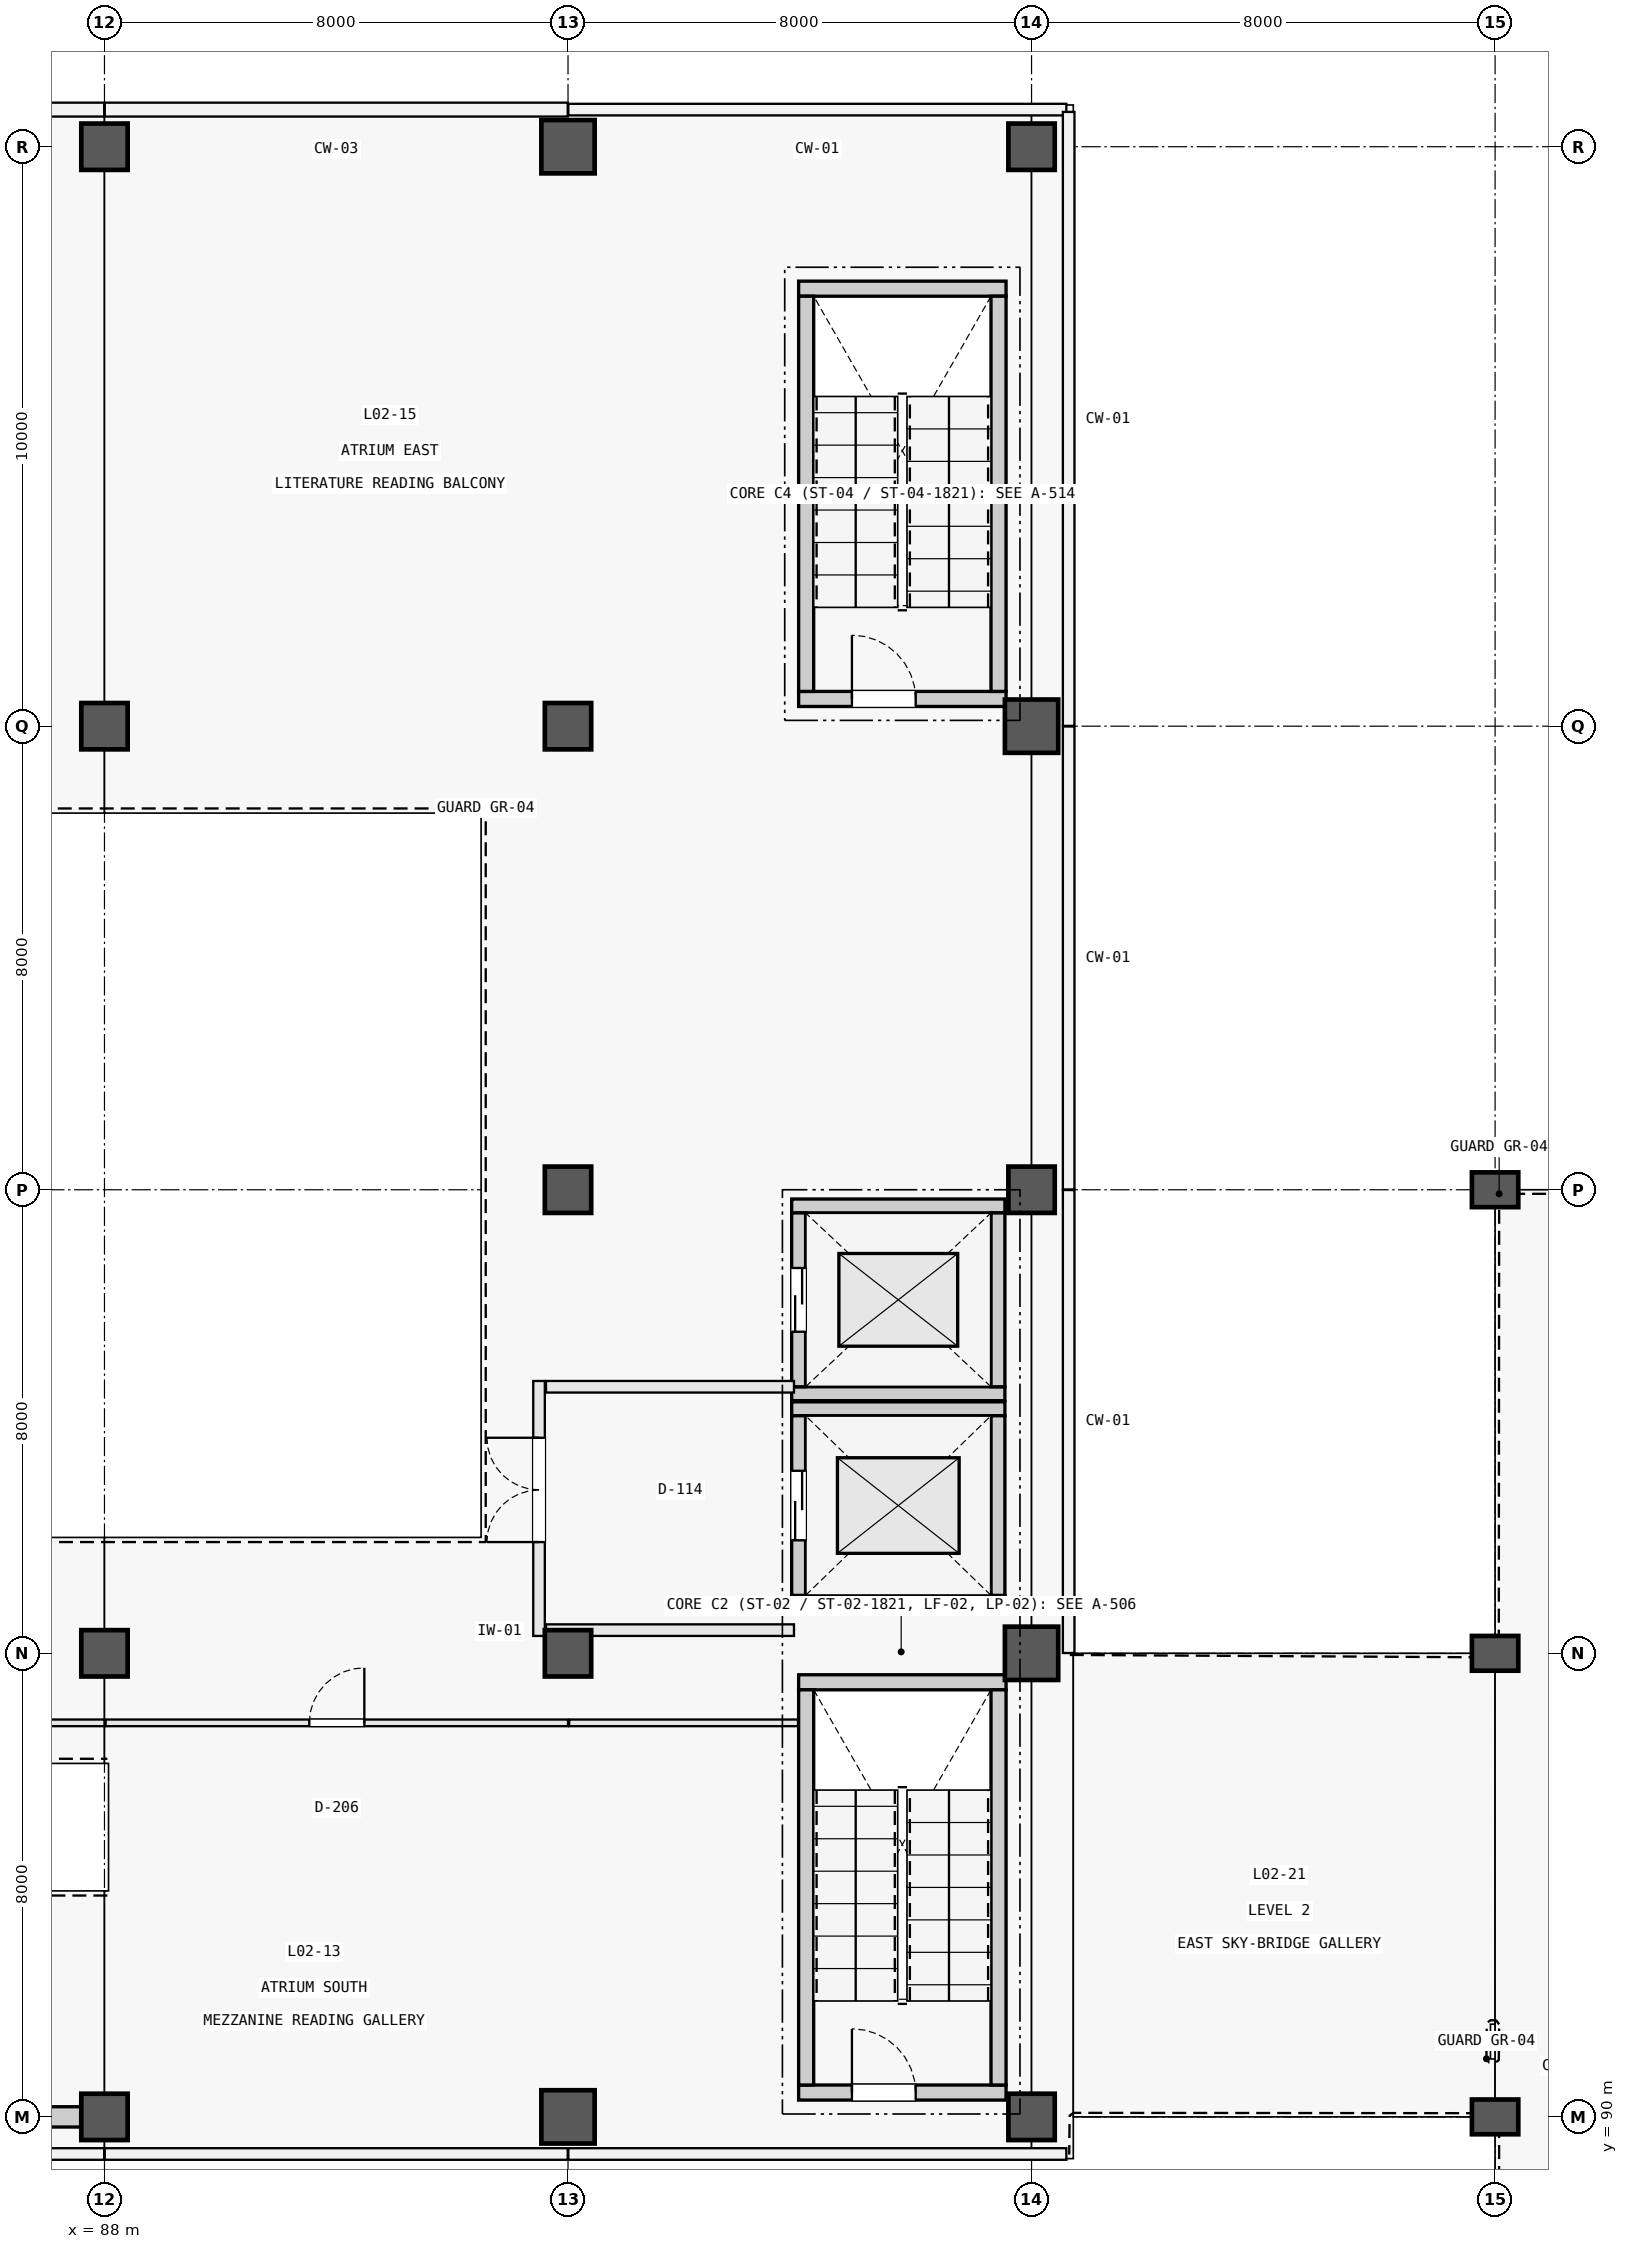
"""IFC4 building model, lengths in metres.
Left out: names, types, materials, properties, quantities, classifications, styles, units other than length and angle.
Written with IfcOpenShell. Run it as: python <this file> out.ifc"""

import sys

from ifc_helpers import new_model, si_unit, direction, frame, frame_2d, origin, origin_2d, place, context, subcontext, project, spatial, rectangle, extrude, element, fill, save


model = new_model("IFC4")
c1 = context("Model", 3, precision=1e-05, world=origin(), true_north=direction((0.0, 1.0)))
c2 = subcontext(c1, "Body", "Model", "MODEL_VIEW")
j1 = project(units=[si_unit("LENGTHUNIT", "METRE"), si_unit("PLANEANGLEUNIT", "RADIAN")], contexts=[c1])
p1 = place(None, origin())
s1 = spatial("IfcSite", under=j1, at=p1, CompositionType="ELEMENT")
p2 = place(p1, origin())
s2 = spatial("IfcBuilding", under=s1, at=p2, CompositionType="ELEMENT")
p3 = place(p2, frame((0.0, 0.0, 5.4)))
s3 = spatial("IfcBuildingStorey", under=s2, at=p3, CompositionType="ELEMENT", Elevation=5.4)
for number, where, z_axis, x_axis in (
    (1, (88.0, 90.0, 0.0), (0.0, 0.0, 1.0), (1.0, 0.0, 0.0)),
    (2, (88.0, 98.0, 0.0), (0.0, 0.0, 1.0), (1.0, 0.0, 0.0)),
    (3, (88.0, 114.0, 0.0), (0.0, 0.0, 1.0), (1.0, 0.0, 0.0)),
    (4, (88.0, 124.0, 0.0), (0.0, 0.0, 1.0), (1.0, 0.0, 0.0)),
):
    element("IfcColumn", number, at=place(p3, frame(where, z_axis=z_axis, x_axis=x_axis)), inside=s3, PredefinedType="COLUMN", context=c2, shape_type="SweptSolid", body=[
        extrude(rectangle(XDim=0.8, YDim=0.8, at=origin_2d()), origin(), (0.0, 0.0, 1.0), 5.1),
    ])
p4 = place(p3, frame((96.0, 90.0, 0.0), z_axis=(0.0, 0.0, 1.0), x_axis=(1.0, 0.0, 0.0)))
e5 = element("IfcColumn", 5, at=p4, inside=s3, PredefinedType="COLUMN", context=c2, shape_type="SweptSolid", body=[
    extrude(rectangle(XDim=0.92, YDim=0.92, at=origin_2d()), origin(), (0.0, 0.0, 1.0), 5.1),
])
for number, where, z_axis, x_axis in (
    (6, (96.0, 98.0, 0.0), (0.0, 0.0, 1.0), (1.0, 0.0, 0.0)),
    (7, (96.0, 106.0, 0.0), (0.0, 0.0, 1.0), (1.0, 0.0, 0.0)),
    (8, (96.0, 114.0, 0.0), (0.0, 0.0, 1.0), (1.0, 0.0, 0.0)),
):
    element("IfcColumn", number, at=place(p3, frame(where, z_axis=z_axis, x_axis=x_axis)), inside=s3, PredefinedType="COLUMN", context=c2, shape_type="SweptSolid", body=[
        extrude(rectangle(XDim=0.8, YDim=0.8, at=origin_2d()), origin(), (0.0, 0.0, 1.0), 5.1),
    ])
p5 = place(p3, frame((96.0, 124.0, 0.0), z_axis=(0.0, 0.0, 1.0), x_axis=(1.0, 0.0, 0.0)))
e9 = element("IfcColumn", 9, at=p5, inside=s3, PredefinedType="COLUMN", context=c2, shape_type="SweptSolid", body=[
    extrude(rectangle(XDim=0.92, YDim=0.92, at=origin_2d()), origin(), (0.0, 0.0, 1.0), 5.1),
])
p6 = place(p3, frame((104.0, 90.0, 0.0), z_axis=(0.0, 0.0, 1.0), x_axis=(1.0, 0.0, 0.0)))
e10 = element("IfcColumn", 10, at=p6, inside=s3, PredefinedType="COLUMN", context=c2, shape_type="SweptSolid", body=[
    extrude(rectangle(XDim=0.8, YDim=0.8, at=origin_2d()), origin(), (0.0, 0.0, 1.0), 5.1),
])
p7 = place(p3, frame((104.0, 98.0, 0.0), z_axis=(0.0, 0.0, 1.0), x_axis=(1.0, 0.0, 0.0)))
e11 = element("IfcColumn", 11, at=p7, inside=s3, PredefinedType="COLUMN", context=c2, shape_type="SweptSolid", body=[
    extrude(rectangle(XDim=0.92, YDim=0.92, at=origin_2d()), origin(), (0.0, 0.0, 1.0), 5.1),
])
p8 = place(p3, frame((104.0, 106.0, 0.0), z_axis=(0.0, 0.0, 1.0), x_axis=(1.0, 0.0, 0.0)))
e12 = element("IfcColumn", 12, at=p8, inside=s3, PredefinedType="COLUMN", context=c2, shape_type="SweptSolid", body=[
    extrude(rectangle(XDim=0.8, YDim=0.8, at=origin_2d()), origin(), (0.0, 0.0, 1.0), 5.1),
])
p9 = place(p3, frame((104.0, 114.0, 0.0), z_axis=(0.0, 0.0, 1.0), x_axis=(1.0, 0.0, 0.0)))
e13 = element("IfcColumn", 13, at=p9, inside=s3, PredefinedType="COLUMN", context=c2, shape_type="SweptSolid", body=[
    extrude(rectangle(XDim=0.92, YDim=0.92, at=origin_2d()), origin(), (0.0, 0.0, 1.0), 5.1),
])
p10 = place(p3, frame((104.0, 124.0, 0.0), z_axis=(0.0, 0.0, 1.0), x_axis=(1.0, 0.0, 0.0)))
e14 = element("IfcColumn", 14, at=p10, inside=s3, PredefinedType="COLUMN", context=c2, shape_type="SweptSolid", body=[
    extrude(rectangle(XDim=0.8, YDim=0.8, at=origin_2d()), origin(), (0.0, 0.0, 1.0), 5.1),
])
for number, where, z_axis, x_axis in (
    (15, (112.0, 90.0, 0.0), (0.0, 0.0, 1.0), (1.0, 0.0, 0.0)),
    (16, (112.0, 98.0, 0.0), (0.0, 0.0, 1.0), (1.0, 0.0, 0.0)),
    (17, (112.0, 106.0, 0.0), (0.0, 0.0, 1.0), (1.0, 0.0, 0.0)),
):
    element("IfcColumn", number, at=place(p3, frame(where, z_axis=z_axis, x_axis=x_axis)), inside=s3, PredefinedType="COLUMN", context=c2, shape_type="SweptSolid", body=[
        extrude(rectangle(XDim=0.8, YDim=0.6, at=origin_2d()), origin(), (0.0, 0.0, 1.0), 5.1),
    ])
p11 = place(p3, frame((80.46, 90.0, 0.0), z_axis=(0.0, 0.0, 1.0), x_axis=(1.0, 0.0, 0.0)))
e18 = element("IfcWall", 18, at=p11, inside=s3, PredefinedType="SHEAR", context=c2, shape_type="SweptSolid", body=[
    extrude(rectangle(XDim=7.14, YDim=0.35, at=frame_2d((3.57, 0.0))), origin(), (0.0, 0.0, 1.0), 4.76),
])
p12 = place(p3, frame((99.98, 90.42, 0.0), z_axis=(0.0, 0.0, 1.0), x_axis=(1.0, 0.0, 0.0)))
e19 = element("IfcWall", 19, at=p12, inside=s3, PredefinedType="SOLIDWALL", context=c2, shape_type="SweptSolid", body=[
    extrude(rectangle(XDim=3.58, YDim=0.26, at=frame_2d((1.79, 0.0))), origin(), (0.0, 0.0, 1.0), 5.1),
])
p13 = place(p12, frame((0.92, 0.0, 0.0)))
e20 = element("IfcOpeningElement", 20, at=p13, cuts=e19, PredefinedType="OPENING", context=c2, shape_type="SweptSolid", body=[
    extrude(rectangle(XDim=1.1, YDim=2.2, at=frame_2d((0.55, 1.1))), frame((0.0, 0.142, 0.0), z_axis=(0.0, -1.0, 0.0), x_axis=(1.0, 0.0, 0.0)), (0.0, 0.0, 1.0), 0.284),
])
p14 = place(p3, frame((99.98, 97.5, 0.0), z_axis=(0.0, 0.0, 1.0), x_axis=(1.0, 0.0, 0.0)))
e21 = element("IfcWall", 21, at=p14, inside=s3, PredefinedType="SOLIDWALL", context=c2, shape_type="SweptSolid", body=[
    extrude(rectangle(XDim=3.58, YDim=0.26, at=frame_2d((1.79, 0.0))), origin(), (0.0, 0.0, 1.0), 5.1),
])
for number, where, z_axis, x_axis in (
    (22, (100.11, 90.55, 0.0), (0.0, 0.0, 1.0), (0.0, 1.0, 0.0)),
    (23, (103.43, 90.55, 0.0), (0.0, 0.0, 1.0), (0.0, 1.0, 0.0)),
):
    element("IfcWall", number, at=place(p3, frame(where, z_axis=z_axis, x_axis=x_axis)), inside=s3, PredefinedType="SOLIDWALL", context=c2, shape_type="SweptSolid", body=[
        extrude(rectangle(XDim=6.82, YDim=0.26, at=frame_2d((3.41, 0.0))), origin(), (0.0, 0.0, 1.0), 5.1),
    ])
p15 = place(p3, frame((99.98, 114.47, 0.0), z_axis=(0.0, 0.0, 1.0), x_axis=(1.0, 0.0, 0.0)))
e24 = element("IfcWall", 24, at=p15, inside=s3, PredefinedType="SOLIDWALL", context=c2, shape_type="SweptSolid", body=[
    extrude(rectangle(XDim=3.58, YDim=0.26, at=frame_2d((1.79, 0.0))), origin(), (0.0, 0.0, 1.0), 5.1),
])
p16 = place(p15, frame((0.92, 0.0, 0.0)))
e25 = element("IfcOpeningElement", 25, at=p16, cuts=e24, PredefinedType="OPENING", context=c2, shape_type="SweptSolid", body=[
    extrude(rectangle(XDim=1.1, YDim=2.2, at=frame_2d((0.55, 1.1))), frame((0.0, 0.142, 0.0), z_axis=(0.0, -1.0, 0.0), x_axis=(1.0, 0.0, 0.0)), (0.0, 0.0, 1.0), 0.284),
])
p17 = place(p3, frame((99.98, 121.55, 0.0), z_axis=(0.0, 0.0, 1.0), x_axis=(1.0, 0.0, 0.0)))
e26 = element("IfcWall", 26, at=p17, inside=s3, PredefinedType="SOLIDWALL", context=c2, shape_type="SweptSolid", body=[
    extrude(rectangle(XDim=3.58, YDim=0.26, at=frame_2d((1.79, 0.0))), origin(), (0.0, 0.0, 1.0), 5.1),
])
for number, where, z_axis, x_axis in (
    (27, (100.11, 114.6, 0.0), (0.0, 0.0, 1.0), (0.0, 1.0, 0.0)),
    (28, (103.43, 114.6, 0.0), (0.0, 0.0, 1.0), (0.0, 1.0, 0.0)),
):
    element("IfcWall", number, at=place(p3, frame(where, z_axis=z_axis, x_axis=x_axis)), inside=s3, PredefinedType="SOLIDWALL", context=c2, shape_type="SweptSolid", body=[
        extrude(rectangle(XDim=6.82, YDim=0.26, at=frame_2d((3.41, 0.0))), origin(), (0.0, 0.0, 1.0), 5.1),
    ])
for number, where, z_axis, x_axis in (
    (29, (99.86, 98.88, 0.0), (0.0, 0.0, 1.0), (1.0, 0.0, 0.0)),
    (30, (99.86, 102.22, 0.0), (0.0, 0.0, 1.0), (1.0, 0.0, 0.0)),
):
    element("IfcWall", number, at=place(p3, frame(where, z_axis=z_axis, x_axis=x_axis)), inside=s3, PredefinedType="SOLIDWALL", context=c2, shape_type="SweptSolid", body=[
        extrude(rectangle(XDim=3.68, YDim=0.24, at=frame_2d((1.84, 0.0))), origin(), (0.0, 0.0, 1.0), 5.1),
    ])
p18 = place(p3, frame((99.98, 99.0, 0.0), z_axis=(0.0, 0.0, 1.0), x_axis=(0.0, 1.0, 0.0)))
e31 = element("IfcWall", 31, at=p18, inside=s3, PredefinedType="SOLIDWALL", context=c2, shape_type="SweptSolid", body=[
    extrude(rectangle(XDim=3.1, YDim=0.24, at=frame_2d((1.55, 0.0))), origin(), (0.0, 0.0, 1.0), 5.1),
])
p19 = place(p18, frame((0.95, 0.0, 0.0)))
e32 = element("IfcOpeningElement", 32, at=p19, cuts=e31, PredefinedType="OPENING", context=c2, shape_type="SweptSolid", body=[
    extrude(rectangle(XDim=1.2, YDim=2.2, at=frame_2d((0.6, 1.1))), frame((0.0, 0.132, 0.0), z_axis=(0.0, -1.0, 0.0), x_axis=(1.0, 0.0, 0.0)), (0.0, 0.0, 1.0), 0.264),
])
p20 = place(p3, frame((103.42, 99.0, 0.0), z_axis=(0.0, 0.0, 1.0), x_axis=(0.0, 1.0, 0.0)))
e33 = element("IfcWall", 33, at=p20, inside=s3, PredefinedType="SOLIDWALL", context=c2, shape_type="SweptSolid", body=[
    extrude(rectangle(XDim=3.1, YDim=0.24, at=frame_2d((1.55, 0.0))), origin(), (0.0, 0.0, 1.0), 5.1),
])
for number, where, z_axis, x_axis in (
    (34, (99.86, 102.48, 0.0), (0.0, 0.0, 1.0), (1.0, 0.0, 0.0)),
    (35, (99.86, 105.72, 0.0), (0.0, 0.0, 1.0), (1.0, 0.0, 0.0)),
):
    element("IfcWall", number, at=place(p3, frame(where, z_axis=z_axis, x_axis=x_axis)), inside=s3, PredefinedType="SOLIDWALL", context=c2, shape_type="SweptSolid", body=[
        extrude(rectangle(XDim=3.68, YDim=0.24, at=frame_2d((1.84, 0.0))), origin(), (0.0, 0.0, 1.0), 5.1),
    ])
p21 = place(p3, frame((99.98, 102.6, 0.0), z_axis=(0.0, 0.0, 1.0), x_axis=(0.0, 1.0, 0.0)))
e36 = element("IfcWall", 36, at=p21, inside=s3, PredefinedType="SOLIDWALL", context=c2, shape_type="SweptSolid", body=[
    extrude(rectangle(XDim=3.0, YDim=0.24, at=frame_2d((1.5, 0.0))), origin(), (0.0, 0.0, 1.0), 5.1),
])
p22 = place(p21, frame((0.95, 0.0, 0.0)))
e37 = element("IfcOpeningElement", 37, at=p22, cuts=e36, PredefinedType="OPENING", context=c2, shape_type="SweptSolid", body=[
    extrude(rectangle(XDim=1.1, YDim=2.2, at=frame_2d((0.55, 1.1))), frame((0.0, 0.132, 0.0), z_axis=(0.0, -1.0, 0.0), x_axis=(1.0, 0.0, 0.0)), (0.0, 0.0, 1.0), 0.264),
])
p23 = place(p3, frame((103.42, 102.6, 0.0), z_axis=(0.0, 0.0, 1.0), x_axis=(0.0, 1.0, 0.0)))
e38 = element("IfcWall", 38, at=p23, inside=s3, PredefinedType="SOLIDWALL", context=c2, shape_type="SweptSolid", body=[
    extrude(rectangle(XDim=3.0, YDim=0.24, at=frame_2d((1.5, 0.0))), origin(), (0.0, 0.0, 1.0), 5.1),
])
for number, where, z_axis, x_axis in (
    (39, (95.62, 98.4, 0.0), (0.0, 0.0, 1.0), (1.0, 0.0, 0.0)),
    (40, (95.62, 102.6, 0.0), (0.0, 0.0, 1.0), (1.0, 0.0, 0.0)),
):
    element("IfcWall", number, at=place(p3, frame(where, z_axis=z_axis, x_axis=x_axis)), inside=s3, PredefinedType="PARTITIONING", context=c2, shape_type="SweptSolid", body=[
        extrude(rectangle(XDim=4.28, YDim=0.2, at=frame_2d((2.14, 0.0))), origin(), (0.0, 0.0, 1.0), 3.78),
    ])
p24 = place(p3, frame((95.5, 98.3, 0.0), z_axis=(0.0, 0.0, 1.0), x_axis=(0.0, 1.0, 0.0)))
e41 = element("IfcWall", 41, at=p24, inside=s3, PredefinedType="PARTITIONING", context=c2, shape_type="SweptSolid", body=[
    extrude(rectangle(XDim=4.4, YDim=0.2, at=frame_2d((2.2, 0.0))), origin(), (0.0, 0.0, 1.0), 3.78),
])
p25 = place(p24, frame((1.62, 0.0, 0.0)))
e42 = element("IfcOpeningElement", 42, at=p25, cuts=e41, PredefinedType="OPENING", context=c2, shape_type="SweptSolid", body=[
    extrude(rectangle(XDim=1.8, YDim=2.25, at=frame_2d((0.9, 1.125))), frame((0.0, 0.112, 0.0), z_axis=(0.0, -1.0, 0.0), x_axis=(1.0, 0.0, 0.0)), (0.0, 0.0, 1.0), 0.224),
])
p26 = place(p3, frame((80.02, 96.8, 0.0), z_axis=(0.0, 0.0, 1.0), x_axis=(1.0, 0.0, 0.0)))
e43 = element("IfcWall", 43, at=p26, inside=s3, PredefinedType="PARTITIONING", context=c2, shape_type="SweptSolid", body=[
    extrude(rectangle(XDim=7.98, YDim=0.115, at=frame_2d((3.99, 0.0))), origin(), (0.0, 0.0, 1.0), 3.61),
])
p27 = place(p26, frame((3.19, 0.0, 0.0)))
e44 = element("IfcOpeningElement", 44, at=p27, cuts=e43, PredefinedType="OPENING", context=c2, shape_type="SweptSolid", body=[
    extrude(rectangle(XDim=1.6, YDim=2.2, at=frame_2d((0.8, 1.1))), frame((0.0, 0.069, 0.0), z_axis=(0.0, -1.0, 0.0), x_axis=(1.0, 0.0, 0.0)), (0.0, 0.0, 1.0), 0.139),
])
p28 = place(p3, frame((88.02, 96.8, 0.0), z_axis=(0.0, 0.0, 1.0), x_axis=(1.0, 0.0, 0.0)))
e45 = element("IfcWall", 45, at=p28, inside=s3, PredefinedType="PARTITIONING", context=c2, shape_type="SweptSolid", body=[
    extrude(rectangle(XDim=7.98, YDim=0.115, at=frame_2d((3.99, 0.0))), origin(), (0.0, 0.0, 1.0), 3.61),
])
p29 = place(p28, frame((3.515, 0.0, 0.0)))
e46 = element("IfcOpeningElement", 46, at=p29, cuts=e45, PredefinedType="OPENING", context=c2, shape_type="SweptSolid", body=[
    extrude(rectangle(XDim=0.95, YDim=2.15, at=frame_2d((0.475, 1.075))), frame((0.0, 0.069, 0.0), z_axis=(0.0, -1.0, 0.0), x_axis=(1.0, 0.0, 0.0)), (0.0, 0.0, 1.0), 0.139),
])
p30 = place(p3, frame((96.02, 96.8, 0.0), z_axis=(0.0, 0.0, 1.0), x_axis=(1.0, 0.0, 0.0)))
e47 = element("IfcWall", 47, at=p30, inside=s3, PredefinedType="PARTITIONING", context=c2, shape_type="SweptSolid", body=[
    extrude(rectangle(XDim=3.95, YDim=0.115, at=frame_2d((1.975, 0.0))), origin(), (0.0, 0.0, 1.0), 3.61),
])
p31 = place(p13, origin())
e48 = element("IfcDoor", 48, at=p31, inside=s3, OperationType="SINGLE_SWING_LEFT", PredefinedType="DOOR", context=c2, shape_type="SweptSolid", body=[
    extrude(rectangle(XDim=1.1, YDim=2.2, at=frame_2d((0.55, 1.1))), frame((0.0, 0.025, 0.0), z_axis=(0.0, -1.0, 0.0), x_axis=(1.0, 0.0, 0.0)), (0.0, 0.0, 1.0), 0.05),
])
fill(e20, e48)
p32 = place(p16, origin())
e49 = element("IfcDoor", 49, at=p32, inside=s3, OperationType="SINGLE_SWING_LEFT", PredefinedType="DOOR", context=c2, shape_type="SweptSolid", body=[
    extrude(rectangle(XDim=1.1, YDim=2.2, at=frame_2d((0.55, 1.1))), frame((0.0, 0.025, 0.0), z_axis=(0.0, -1.0, 0.0), x_axis=(1.0, 0.0, 0.0)), (0.0, 0.0, 1.0), 0.05),
])
fill(e25, e49)
p33 = place(p19, origin())
e50 = element("IfcDoor", 50, at=p33, inside=s3, OperationType="DOUBLE_DOOR_SLIDING", PredefinedType="DOOR", context=c2, shape_type="SweptSolid", body=[
    extrude(rectangle(XDim=1.2, YDim=2.2, at=frame_2d((0.6, 1.1))), frame((0.0, 0.025, 0.0), z_axis=(0.0, -1.0, 0.0), x_axis=(1.0, 0.0, 0.0)), (0.0, 0.0, 1.0), 0.05),
])
fill(e32, e50)
p34 = place(p22, origin())
e51 = element("IfcDoor", 51, at=p34, inside=s3, OperationType="DOUBLE_DOOR_SLIDING", PredefinedType="DOOR", context=c2, shape_type="SweptSolid", body=[
    extrude(rectangle(XDim=1.1, YDim=2.2, at=frame_2d((0.55, 1.1))), frame((0.0, 0.025, 0.0), z_axis=(0.0, -1.0, 0.0), x_axis=(1.0, 0.0, 0.0)), (0.0, 0.0, 1.0), 0.05),
])
fill(e37, e51)
p35 = place(p25, origin())
e52 = element("IfcDoor", 52, at=p35, inside=s3, OperationType="DOUBLE_DOOR_SINGLE_SWING", PredefinedType="DOOR", context=c2, shape_type="SweptSolid", body=[
    extrude(rectangle(XDim=1.8, YDim=2.25, at=frame_2d((0.9, 1.125))), frame((0.0, 0.025, 0.0), z_axis=(0.0, -1.0, 0.0), x_axis=(1.0, 0.0, 0.0)), (0.0, 0.0, 1.0), 0.05),
])
fill(e42, e52)
p36 = place(p29, origin())
e53 = element("IfcDoor", 53, at=p36, inside=s3, OperationType="SINGLE_SWING_RIGHT", PredefinedType="DOOR", context=c2, shape_type="SweptSolid", body=[
    extrude(rectangle(XDim=0.95, YDim=2.15, at=frame_2d((0.475, 1.075))), frame((0.0, 0.025, 0.0), z_axis=(0.0, -1.0, 0.0), x_axis=(1.0, 0.0, 0.0)), (0.0, 0.0, 1.0), 0.05),
])
fill(e46, e53)
save(model, sys.argv[1])
